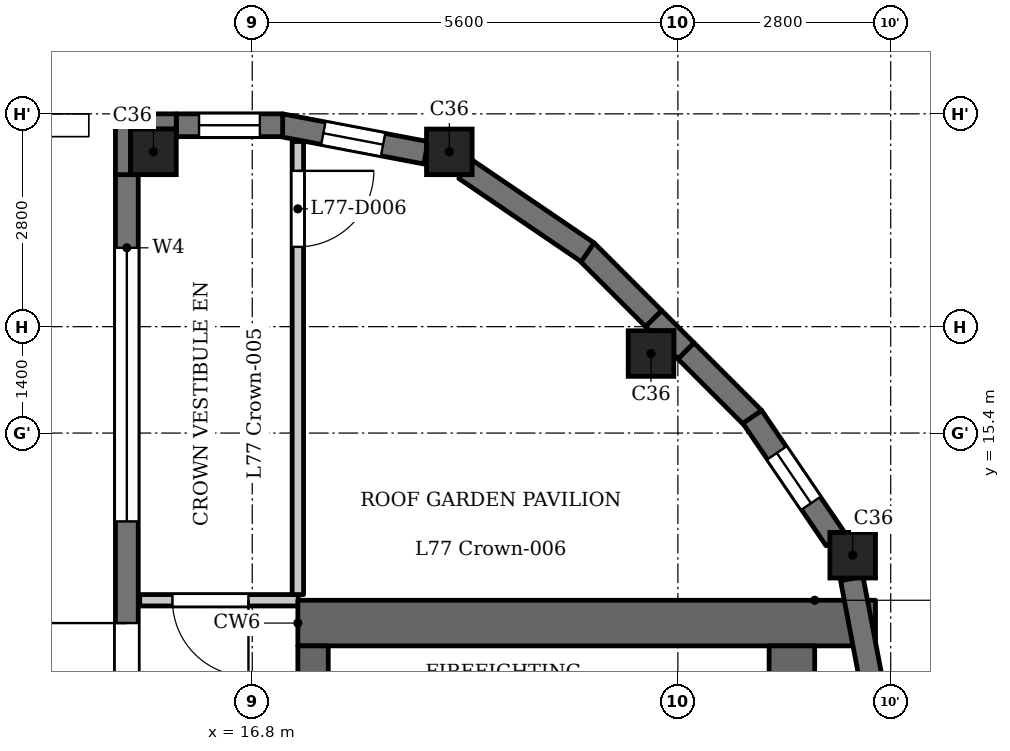
"""IFC4 building model, lengths in metres.
Left out: names, types, materials, properties, quantities, classifications, styles, units other than length and angle.
Written with IfcOpenShell. Run it as: python <this file> out.ifc"""

import sys

from ifc_helpers import new_model, si_unit, direction, frame, frame_2d, origin, origin_2d, place, context, subcontext, project, spatial, polyline, rectangle, outline, extrude, element, fill, save


model = new_model("IFC4")
c1 = context("Model", 3, precision=1e-05, world=origin(), true_north=direction((0.0, 1.0)))
c2 = subcontext(c1, "Body", "Model", "MODEL_VIEW")
j1 = project(units=[si_unit("LENGTHUNIT", "METRE"), si_unit("PLANEANGLEUNIT", "RADIAN")], contexts=[c1])
p1 = place(None, origin())
s1 = spatial("IfcSite", under=j1, at=p1, CompositionType="ELEMENT")
p2 = place(p1, origin())
s2 = spatial("IfcBuilding", under=s1, at=p2, CompositionType="ELEMENT")
p3 = place(p2, frame((0.0, 0.0, 299.9)))
s3 = spatial("IfcBuildingStorey", under=s2, at=p3, CompositionType="ELEMENT", Elevation=299.9)
for number, where, z_axis, x_axis in (
    (1, (15.5, 19.1, 0.0), (0.0, 0.0, 1.0), (1.0, 0.0, 0.0)),
    (2, (19.393, 19.1, 0.0), (0.0, 0.0, 1.0), (1.0, 0.0, 0.0)),
    (3, (22.046, 16.446, 0.0), (0.0, 0.0, 1.0), (1.0, 0.0, 0.0)),
    (4, (24.7, 13.793, 0.0), (0.0, 0.0, 1.0), (1.0, 0.0, 0.0)),
):
    element("IfcColumn", number, at=place(p3, frame(where, z_axis=z_axis, x_axis=x_axis)), inside=s3, PredefinedType="COLUMN", context=c2, shape_type="SweptSolid", body=[
        extrude(rectangle(XDim=0.6, YDim=0.6, at=origin_2d()), origin(), (0.0, 0.0, 1.0), 3.5),
    ])
p4 = place(p3, frame((15.15, 18.8, 0.0), z_axis=(0.0, 0.0, 1.0), x_axis=(0.0, -1.0, 0.0)))
e5 = element("IfcWall", 5, at=p4, inside=s3, PredefinedType="SOLIDWALL", context=c2, shape_type="SweptSolid", body=[
    extrude(rectangle(XDim=7.3, YDim=0.3, at=frame_2d((3.65, 0.0))), origin(), (0.0, 0.0, 1.0), 3.2),
])
p5 = place(p4, frame((5.9, 0.0, 0.0)))
e6 = element("IfcOpeningElement", 6, at=p5, cuts=e5, PredefinedType="OPENING", context=c2, shape_type="SweptSolid", body=[
    extrude(rectangle(XDim=1.2, YDim=2.1, at=frame_2d((0.6, 1.05))), frame((0.0, 0.16, 0.0), z_axis=(0.0, -1.0, 0.0), x_axis=(1.0, 0.0, 0.0)), (0.0, 0.0, 1.0), 0.32),
])
p6 = place(p4, frame((0.962, 0.0, 1.2)))
e7 = element("IfcOpeningElement", 7, at=p6, cuts=e5, PredefinedType="OPENING", context=c2, shape_type="SweptSolid", body=[
    extrude(rectangle(XDim=3.6, YDim=0.95, at=frame_2d((1.8, 0.475))), frame((0.0, 0.16, 0.0), z_axis=(0.0, -1.0, 0.0), x_axis=(1.0, 0.0, 0.0)), (0.0, 0.0, 1.0), 0.32),
])
p7 = place(p3, frame((25.052, 11.573, 0.0), z_axis=(0.0, 0.0, 1.0), x_axis=(-0.187354129902, 0.982292436095, 0.0)))
e8 = element("IfcWall", 8, at=p7, inside=s3, PredefinedType="SOLIDWALL", context=c2, shape_type="SweptSolid", body=[
    extrude(rectangle(XDim=1.947, YDim=0.3, at=frame_2d((0.973, 0.0))), origin(), (0.0, 0.0, 1.0), 2.6),
])
p8 = place(p3, frame((24.474, 14.002, 0.0), z_axis=(0.0, 0.0, 1.0), x_axis=(-0.562025435703, 0.827119948752, 0.0)))
e9 = element("IfcWall", 9, at=p8, inside=s3, PredefinedType="SOLIDWALL", context=c2, shape_type="SweptSolid", body=[
    extrude(rectangle(XDim=1.948, YDim=0.3, at=frame_2d((0.974, 0.0))), origin(), (0.0, 0.0, 1.0), 2.6),
])
p9 = place(p8, frame((0.574, 0.0, 0.6)))
e10 = element("IfcOpeningElement", 10, at=p9, cuts=e9, PredefinedType="OPENING", context=c2, shape_type="SweptSolid", body=[
    extrude(rectangle(XDim=0.8, YDim=1.55, at=frame_2d((0.4, 0.775))), frame((0.0, 0.16, 0.0), z_axis=(0.0, -1.0, 0.0), x_axis=(1.0, 0.0, 0.0)), (0.0, 0.0, 1.0), 0.32),
])
for number, where, z_axis, x_axis in (
    (11, (23.397, 15.591, 0.0), (0.0, 0.0, 1.0), (-0.707, 0.707, 0.0)),
    (12, (22.082, 16.906, 0.0), (0.0, 0.0, 1.0), (-0.707, 0.707, 0.0)),
):
    element("IfcWall", number, at=place(p3, frame(where, z_axis=z_axis, x_axis=x_axis)), inside=s3, PredefinedType="SOLIDWALL", context=c2, shape_type="SweptSolid", body=[
        extrude(rectangle(XDim=1.26, YDim=0.3, at=frame_2d((0.63, 0.0))), origin(), (0.0, 0.0, 1.0), 3.2),
    ])
p10 = place(p3, frame((21.213, 17.779, 0.0), z_axis=(0.0, 0.0, 1.0), x_axis=(-0.827022075481, 0.562169446579, 0.0)))
e13 = element("IfcWall", 13, at=p10, inside=s3, PredefinedType="SOLIDWALL", context=c2, shape_type="SweptSolid", body=[
    extrude(rectangle(XDim=1.948, YDim=0.3, at=frame_2d((0.974, 0.0))), origin(), (0.0, 0.0, 1.0), 2.6),
])
p11 = place(p3, frame((19.085, 19.088, 0.0), z_axis=(0.0, 0.0, 1.0), x_axis=(-0.982286967073, 0.187382801553, 0.0)))
e14 = element("IfcWall", 14, at=p11, inside=s3, PredefinedType="SOLIDWALL", context=c2, shape_type="SweptSolid", body=[
    extrude(rectangle(XDim=1.948, YDim=0.3, at=frame_2d((0.974, 0.0))), origin(), (0.0, 0.0, 1.0), 2.6),
])
p12 = place(p11, frame((0.574, 0.0, 0.6)))
e15 = element("IfcOpeningElement", 15, at=p12, cuts=e14, PredefinedType="OPENING", context=c2, shape_type="SweptSolid", body=[
    extrude(rectangle(XDim=0.8, YDim=1.55, at=frame_2d((0.4, 0.775))), frame((0.0, 0.16, 0.0), z_axis=(0.0, -1.0, 0.0), x_axis=(1.0, 0.0, 0.0)), (0.0, 0.0, 1.0), 0.32),
])
p13 = place(p3, frame((17.2, 19.45, 0.0), z_axis=(0.0, 0.0, 1.0), x_axis=(-1.0, 0.0, 0.0)))
e16 = element("IfcWall", 16, at=p13, inside=s3, PredefinedType="SOLIDWALL", context=c2, shape_type="SweptSolid", body=[
    extrude(rectangle(XDim=1.4, YDim=0.3, at=frame_2d((0.7, 0.0))), origin(), (0.0, 0.0, 1.0), 3.2),
])
p14 = place(p13, frame((0.3, 0.0, 0.6)))
e17 = element("IfcOpeningElement", 17, at=p14, cuts=e16, PredefinedType="OPENING", context=c2, shape_type="SweptSolid", body=[
    extrude(rectangle(XDim=0.8, YDim=1.55, at=frame_2d((0.4, 0.775))), frame((0.0, 0.16, 0.0), z_axis=(0.0, -1.0, 0.0), x_axis=(1.0, 0.0, 0.0)), (0.0, 0.0, 1.0), 0.32),
])
p15 = place(p3, origin())
e18 = element("IfcWall", 18, at=p15, inside=s3, PredefinedType="PARAPET", context=c2, shape_type="SweptSolid", body=[
    extrude(outline(polyline([(14.65, 19.6), (7.0, 19.6), (7.0, 19.3), (14.65, 19.3), (14.65, 19.6)])), origin(), (0.0, 0.0, 1.0), 1.1),
])
p16 = place(p3, frame((17.4, 12.9, 0.0), z_axis=(0.0, 0.0, 1.0), x_axis=(1.0, 0.0, 0.0)))
e19 = element("IfcWall", 19, at=p16, inside=s3, PredefinedType="SHEAR", context=c2, shape_type="SweptSolid", body=[
    extrude(rectangle(XDim=7.6, YDim=0.6, at=frame_2d((3.8, 0.0))), origin(), (0.0, 0.0, 1.0), 3.2),
])
p17 = place(p3, frame((17.6, -12.6, 0.0), z_axis=(0.0, 0.0, 1.0), x_axis=(0.0, 1.0, 0.0)))
e20 = element("IfcWall", 20, at=p17, inside=s3, PredefinedType="SHEAR", context=c2, shape_type="SweptSolid", body=[
    extrude(rectangle(XDim=25.2, YDim=0.4, at=frame_2d((12.6, 0.0))), origin(), (0.0, 0.0, 1.0), 3.2),
])
p18 = place(p17, frame((11.2, 0.0, 0.0)))
e21 = element("IfcOpeningElement", 21, at=p18, cuts=e20, PredefinedType="OPENING", context=c2, shape_type="SweptSolid", body=[
    extrude(rectangle(XDim=0.9, YDim=2.1, at=frame_2d((0.45, 1.05))), frame((0.0, 0.21, 0.0), z_axis=(0.0, -1.0, 0.0), x_axis=(1.0, 0.0, 0.0)), (0.0, 0.0, 1.0), 0.42),
])
p19 = place(p17, frame((17.05, 0.0, 0.0)))
e22 = element("IfcOpeningElement", 22, at=p19, cuts=e20, PredefinedType="OPENING", context=c2, shape_type="SweptSolid", body=[
    extrude(rectangle(XDim=0.9, YDim=2.1, at=frame_2d((0.45, 1.05))), frame((0.0, 0.21, 0.0), z_axis=(0.0, -1.0, 0.0), x_axis=(1.0, 0.0, 0.0)), (0.0, 0.0, 1.0), 0.42),
])
p20 = place(p17, frame((23.25, 0.0, 0.0)))
e23 = element("IfcOpeningElement", 23, at=p20, cuts=e20, PredefinedType="OPENING", context=c2, shape_type="SweptSolid", body=[
    extrude(rectangle(XDim=1.1, YDim=2.1, at=frame_2d((0.55, 1.05))), frame((0.0, 0.21, 0.0), z_axis=(0.0, -1.0, 0.0), x_axis=(1.0, 0.0, 0.0)), (0.0, 0.0, 1.0), 0.42),
])
p21 = place(p17, frame((0.85, 0.0, 0.0)))
e24 = element("IfcOpeningElement", 24, at=p21, cuts=e20, PredefinedType="OPENING", context=c2, shape_type="SweptSolid", body=[
    extrude(rectangle(XDim=1.1, YDim=2.1, at=frame_2d((0.55, 1.05))), frame((0.0, 0.21, 0.0), z_axis=(0.0, -1.0, 0.0), x_axis=(1.0, 0.0, 0.0)), (0.0, 0.0, 1.0), 0.42),
])
p22 = place(p17, frame((13.075, 0.0, 0.0)))
e25 = element("IfcOpeningElement", 25, at=p22, cuts=e20, PredefinedType="OPENING", context=c2, shape_type="SweptSolid", body=[
    extrude(rectangle(XDim=1.8, YDim=2.1, at=frame_2d((0.9, 1.05))), frame((0.0, 0.21, 0.0), z_axis=(0.0, -1.0, 0.0), x_axis=(1.0, 0.0, 0.0)), (0.0, 0.0, 1.0), 0.42),
])
p23 = place(p3, frame((23.9, -12.6, 0.0), z_axis=(0.0, 0.0, 1.0), x_axis=(0.0, 1.0, 0.0)))
e26 = element("IfcWall", 26, at=p23, inside=s3, PredefinedType="SHEAR", context=c2, shape_type="SweptSolid", body=[
    extrude(rectangle(XDim=25.2, YDim=0.6, at=frame_2d((12.6, 0.0))), origin(), (0.0, 0.0, 1.0), 3.2),
])
p24 = place(p3, frame((15.32, 13.2, 0.0), z_axis=(0.0, 0.0, 1.0), x_axis=(1.0, 0.0, 0.0)))
e27 = element("IfcWall", 27, at=p24, inside=s3, PredefinedType="PARTITIONING", context=c2, shape_type="SweptSolid", body=[
    extrude(rectangle(XDim=2.085, YDim=0.15, at=frame_2d((1.042, 0.0))), origin(), (0.0, 0.0, 1.0), 3.2),
])
p25 = place(p24, frame((0.43, 0.0, 0.0)))
e28 = element("IfcOpeningElement", 28, at=p25, cuts=e27, PredefinedType="OPENING", context=c2, shape_type="SweptSolid", body=[
    extrude(rectangle(XDim=1.0, YDim=2.1, at=frame_2d((0.5, 1.05))), frame((0.0, 0.085, 0.0), z_axis=(0.0, -1.0, 0.0), x_axis=(1.0, 0.0, 0.0)), (0.0, 0.0, 1.0), 0.17),
])
p26 = place(p3, frame((17.4, 13.275, 0.0), z_axis=(0.0, 0.0, 1.0), x_axis=(0.0, 1.0, 0.0)))
e29 = element("IfcWall", 29, at=p26, inside=s3, PredefinedType="PARTITIONING", context=c2, shape_type="SweptSolid", body=[
    extrude(rectangle(XDim=5.961, YDim=0.15, at=frame_2d((2.981, 0.0))), origin(), (0.0, 0.0, 1.0), 3.2),
])
p27 = place(p26, frame((4.575, 0.0, 0.0)))
e30 = element("IfcOpeningElement", 30, at=p27, cuts=e29, PredefinedType="OPENING", context=c2, shape_type="SweptSolid", body=[
    extrude(rectangle(XDim=1.0, YDim=2.1, at=frame_2d((0.5, 1.05))), frame((0.0, 0.085, 0.0), z_axis=(0.0, -1.0, 0.0), x_axis=(1.0, 0.0, 0.0)), (0.0, 0.0, 1.0), 0.17),
])
e31 = element("IfcWall", 31, at=p15, inside=s3, PredefinedType="SOLIDWALL", context=c2, shape_type="SweptSolid", body=[
    extrude(outline(polyline([(22.4, 16.376), (22.612, 16.588), (22.188, 17.012), (21.976, 16.8), (22.029, 16.746), (22.346, 16.746), (22.346, 16.429), (22.4, 16.376)])), origin(), (0.0, 0.0, 1.0), 3.2),
])
e32 = element("IfcWall", 32, at=p15, inside=s3, PredefinedType="SOLIDWALL", context=c2, shape_type="SweptSolid", body=[
    extrude(outline(polyline([(15.8, 19.6), (15.0, 19.6), (15.0, 18.8), (15.2, 18.8), (15.2, 19.4), (15.8, 19.4), (15.8, 19.6)])), origin(), (0.0, 0.0, 1.0), 3.2),
])
p28 = place(p25, origin())
e33 = element("IfcDoor", 33, at=p28, inside=s3, OperationType="SINGLE_SWING_RIGHT", PredefinedType="DOOR", context=c2, shape_type="SweptSolid", body=[
    extrude(rectangle(XDim=1.0, YDim=2.1, at=frame_2d((0.5, 1.05))), frame((0.0, 0.025, 0.0), z_axis=(0.0, -1.0, 0.0), x_axis=(1.0, 0.0, 0.0)), (0.0, 0.0, 1.0), 0.05),
])
fill(e28, e33)
p29 = place(p27, origin())
e34 = element("IfcDoor", 34, at=p29, inside=s3, OperationType="SINGLE_SWING_RIGHT", PredefinedType="DOOR", context=c2, shape_type="SweptSolid", body=[
    extrude(rectangle(XDim=1.0, YDim=2.1, at=frame_2d((0.5, 1.05))), frame((0.0, 0.025, 0.0), z_axis=(0.0, -1.0, 0.0), x_axis=(1.0, 0.0, 0.0)), (0.0, 0.0, 1.0), 0.05),
])
fill(e30, e34)
p30 = place(p5, origin())
e35 = element("IfcDoor", 35, at=p30, inside=s3, OperationType="SINGLE_SWING_LEFT", PredefinedType="DOOR", context=c2, shape_type="SweptSolid", body=[
    extrude(rectangle(XDim=1.2, YDim=2.1, at=frame_2d((0.6, 1.05))), frame((0.0, 0.025, 0.0), z_axis=(0.0, -1.0, 0.0), x_axis=(1.0, 0.0, 0.0)), (0.0, 0.0, 1.0), 0.05),
])
fill(e6, e35)
p31 = place(p6, origin())
e36 = element("IfcWindow", 36, at=p31, inside=s3, PartitioningType="SINGLE_PANEL", PredefinedType="WINDOW", context=c2, shape_type="SweptSolid", body=[
    extrude(rectangle(XDim=3.6, YDim=0.95, at=frame_2d((1.8, 0.475))), frame((0.0, 0.03, 0.0), z_axis=(0.0, -1.0, 0.0), x_axis=(1.0, 0.0, 0.0)), (0.0, 0.0, 1.0), 0.06),
])
fill(e7, e36)
p32 = place(p9, origin())
e37 = element("IfcWindow", 37, at=p32, inside=s3, PartitioningType="SINGLE_PANEL", PredefinedType="WINDOW", context=c2, shape_type="SweptSolid", body=[
    extrude(rectangle(XDim=0.8, YDim=1.55, at=frame_2d((0.4, 0.775))), frame((0.0, 0.03, 0.0), z_axis=(0.0, -1.0, 0.0), x_axis=(1.0, 0.0, 0.0)), (0.0, 0.0, 1.0), 0.06),
])
fill(e10, e37)
p33 = place(p12, origin())
e38 = element("IfcWindow", 38, at=p33, inside=s3, PartitioningType="SINGLE_PANEL", PredefinedType="WINDOW", context=c2, shape_type="SweptSolid", body=[
    extrude(rectangle(XDim=0.8, YDim=1.55, at=frame_2d((0.4, 0.775))), frame((0.0, 0.03, 0.0), z_axis=(0.0, -1.0, 0.0), x_axis=(1.0, 0.0, 0.0)), (0.0, 0.0, 1.0), 0.06),
])
fill(e15, e38)
p34 = place(p14, origin())
e39 = element("IfcWindow", 39, at=p34, inside=s3, PartitioningType="SINGLE_PANEL", PredefinedType="WINDOW", context=c2, shape_type="SweptSolid", body=[
    extrude(rectangle(XDim=0.8, YDim=1.55, at=frame_2d((0.4, 0.775))), frame((0.0, 0.03, 0.0), z_axis=(0.0, -1.0, 0.0), x_axis=(1.0, 0.0, 0.0)), (0.0, 0.0, 1.0), 0.06),
])
fill(e17, e39)
save(model, sys.argv[1])
